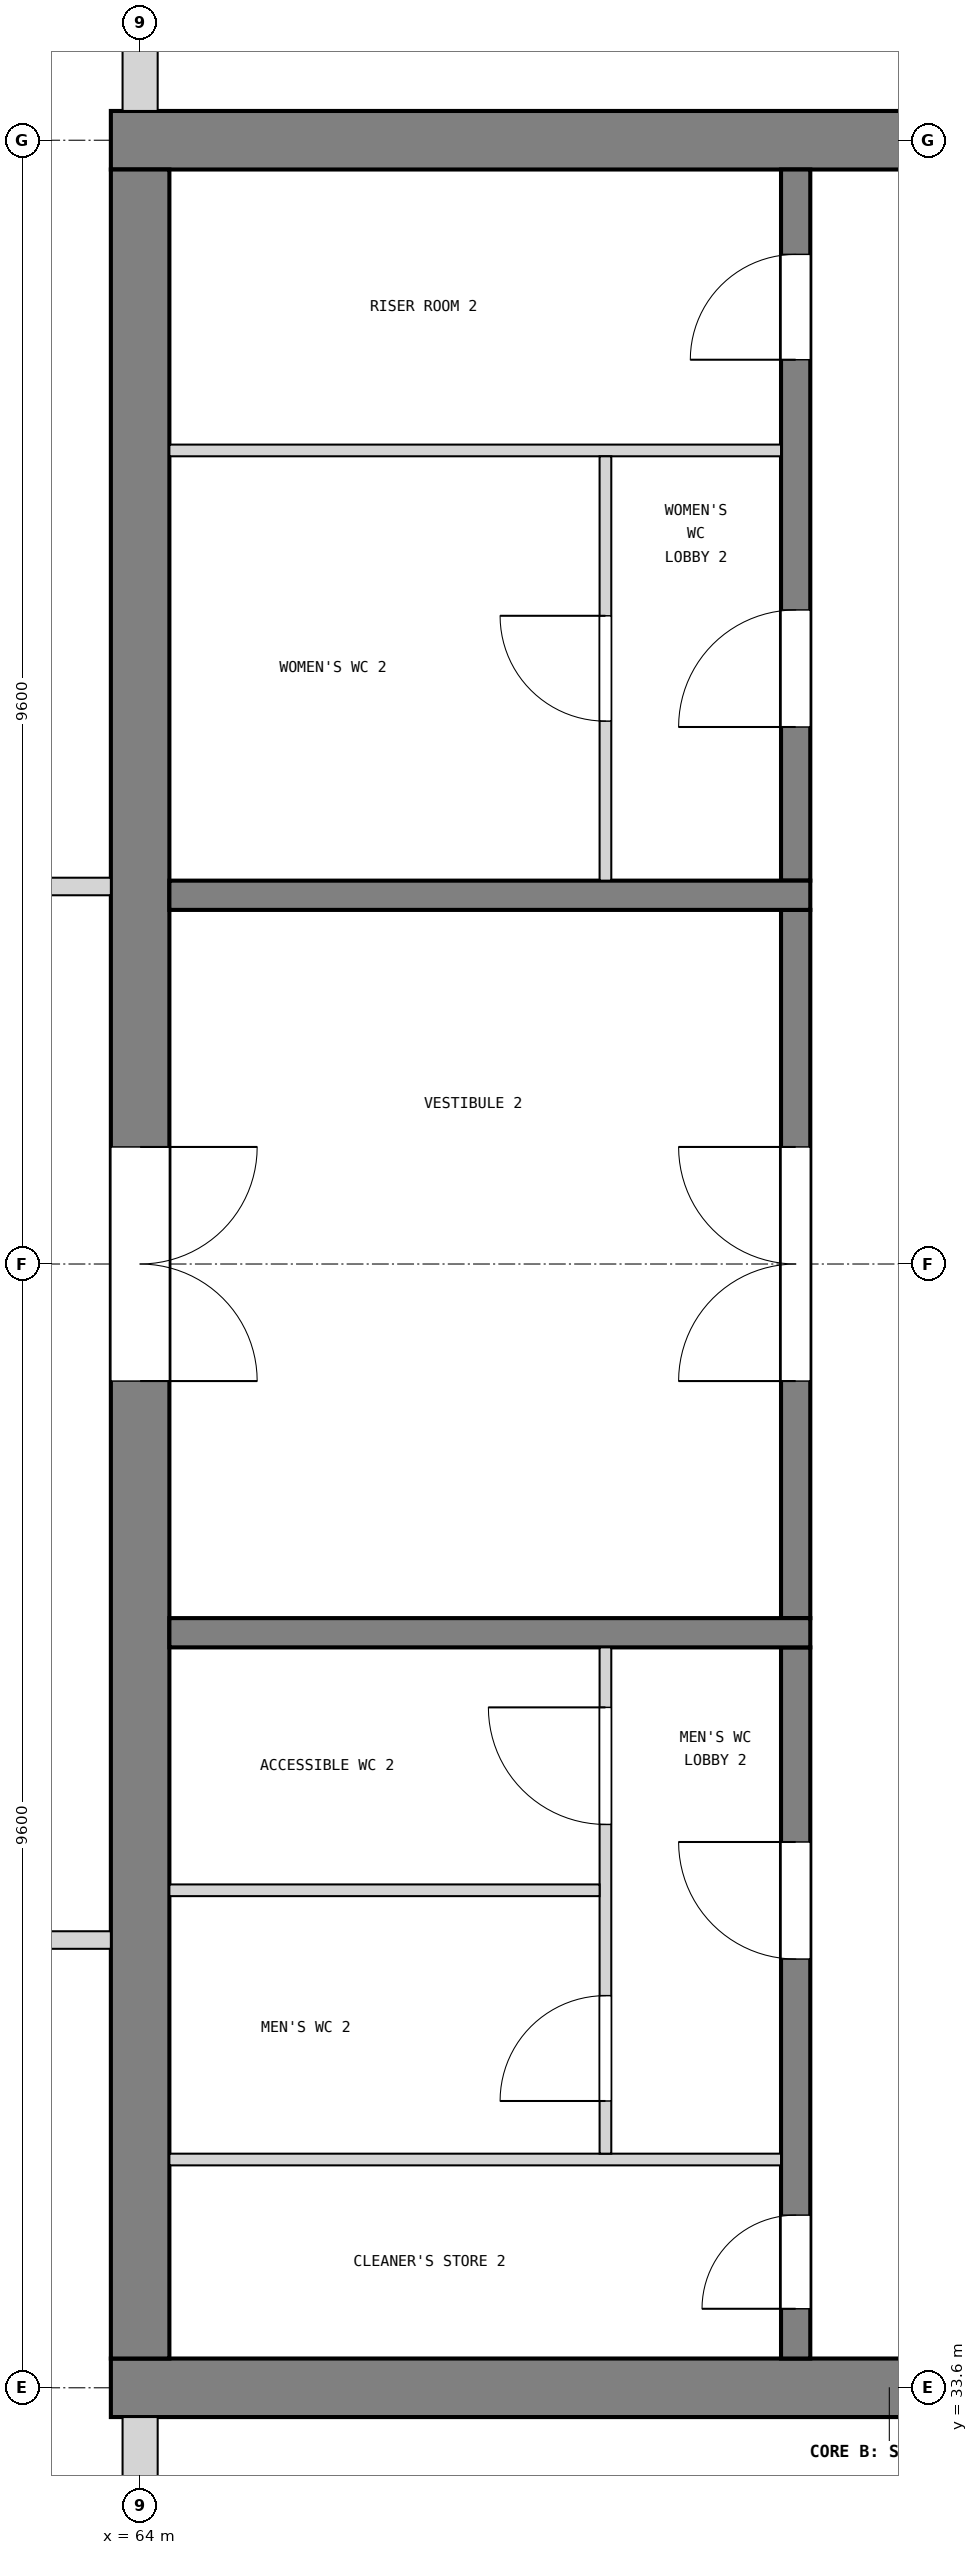
"""IFC4 building model, lengths in metres.
Left out: names, types, materials, properties, quantities, classifications, styles, units other than length and angle.
Written with IfcOpenShell. Run it as: python <this file> out.ifc"""

import sys

from ifc_helpers import new_model, si_unit, direction, frame, frame_2d, origin, place, context, subcontext, project, spatial, rectangle, extrude, element, fill, save


model = new_model("IFC4")
c1 = context("Model", 3, precision=1e-05, world=origin(), true_north=direction((0.0, 1.0)))
c2 = subcontext(c1, "Body", "Model", "MODEL_VIEW")
j1 = project(units=[si_unit("LENGTHUNIT", "METRE"), si_unit("PLANEANGLEUNIT", "RADIAN")], contexts=[c1])
p1 = place(None, origin())
s1 = spatial("IfcSite", under=j1, at=p1, CompositionType="ELEMENT")
p2 = place(p1, origin())
s2 = spatial("IfcBuilding", under=s1, at=p2, CompositionType="ELEMENT")
p3 = place(p2, frame((0.0, 0.0, 56.1)))
s3 = spatial("IfcBuildingStorey", under=s2, at=p3, CompositionType="ELEMENT", Elevation=56.1)
p4 = place(p3, frame((63.75, 52.8, 0.0), z_axis=(0.0, 0.0, 1.0), x_axis=(1.0, 0.0, 0.0)))
e1 = element("IfcWall", 1, at=p4, inside=s3, PredefinedType="SHEAR", context=c2, shape_type="SweptSolid", body=[
    extrude(rectangle(XDim=13.3, YDim=0.5, at=frame_2d((6.65, 0.0))), origin(), (0.0, 0.0, 1.0), 3.9),
])
p5 = place(p4, frame((11.05, 0.0, 1.0)))
e2 = element("IfcOpeningElement", 2, at=p5, cuts=e1, PredefinedType="OPENING", context=c2, shape_type="SweptSolid", body=[
    extrude(rectangle(XDim=0.4, YDim=2.0, at=frame_2d((0.2, 1.0))), frame((0.0, 0.26, 0.0), z_axis=(0.0, -1.0, 0.0), x_axis=(1.0, 0.0, 0.0)), (0.0, 0.0, 1.0), 0.52),
])
p6 = place(p3, frame((63.75, 33.6, 0.0), z_axis=(0.0, 0.0, 1.0), x_axis=(1.0, 0.0, 0.0)))
e3 = element("IfcWall", 3, at=p6, inside=s3, PredefinedType="SHEAR", context=c2, shape_type="SweptSolid", body=[
    extrude(rectangle(XDim=13.3, YDim=0.5, at=frame_2d((6.65, 0.0))), origin(), (0.0, 0.0, 1.0), 3.9),
])
p7 = place(p6, frame((11.05, 0.0, 1.0)))
e4 = element("IfcOpeningElement", 4, at=p7, cuts=e3, PredefinedType="OPENING", context=c2, shape_type="SweptSolid", body=[
    extrude(rectangle(XDim=0.4, YDim=2.0, at=frame_2d((0.2, 1.0))), frame((0.0, 0.26, 0.0), z_axis=(0.0, -1.0, 0.0), x_axis=(1.0, 0.0, 0.0)), (0.0, 0.0, 1.0), 0.52),
])
p8 = place(p3, frame((64.0, 33.85, 0.0), z_axis=(0.0, 0.0, 1.0), x_axis=(0.0, 1.0, 0.0)))
e5 = element("IfcWall", 5, at=p8, inside=s3, PredefinedType="SHEAR", context=c2, shape_type="SweptSolid", body=[
    extrude(rectangle(XDim=18.7, YDim=0.5, at=frame_2d((9.35, 0.0))), origin(), (0.0, 0.0, 1.0), 3.9),
])
p9 = place(p8, frame((8.35, 0.0, 0.0)))
e6 = element("IfcOpeningElement", 6, at=p9, cuts=e5, PredefinedType="OPENING", context=c2, shape_type="SweptSolid", body=[
    extrude(rectangle(XDim=2.0, YDim=2.1, at=frame_2d((1.0, 1.05))), frame((0.0, 0.26, 0.0), z_axis=(0.0, -1.0, 0.0), x_axis=(1.0, 0.0, 0.0)), (0.0, 0.0, 1.0), 0.52),
])
p10 = place(p3, frame((64.0, 31.0, 0.0), z_axis=(0.0, 0.0, 1.0), x_axis=(0.0, 1.0, 0.0)))
e7 = element("IfcWall", 7, at=p10, inside=s3, PredefinedType="SOLIDWALL", context=c2, shape_type="SweptSolid", body=[
    extrude(rectangle(XDim=2.35, YDim=0.3, at=frame_2d((1.175, 0.0))), origin(), (0.0, 0.0, 1.0), 2.88),
])
p11 = place(p3, frame((64.0, 53.05, 0.0), z_axis=(0.0, 0.0, 1.0), x_axis=(0.0, 1.0, 0.0)))
e8 = element("IfcWall", 8, at=p11, inside=s3, PredefinedType="SOLIDWALL", context=c2, shape_type="SweptSolid", body=[
    extrude(rectangle(XDim=2.35, YDim=0.3, at=frame_2d((1.175, 0.0))), origin(), (0.0, 0.0, 1.0), 2.88),
])
p12 = place(p3, frame((69.6, 33.85, 0.0), z_axis=(0.0, 0.0, 1.0), x_axis=(0.0, 1.0, 0.0)))
e9 = element("IfcWall", 9, at=p12, inside=s3, PredefinedType="SOLIDWALL", context=c2, shape_type="SweptSolid", body=[
    extrude(rectangle(XDim=6.075, YDim=0.25, at=frame_2d((3.038, 0.0))), origin(), (0.0, 0.0, 1.0), 3.6),
])
p13 = place(p12, frame((0.425, 0.0, 0.0)))
e10 = element("IfcOpeningElement", 10, at=p13, cuts=e9, PredefinedType="OPENING", context=c2, shape_type="SweptSolid", body=[
    extrude(rectangle(XDim=0.8, YDim=2.1, at=frame_2d((0.4, 1.05))), frame((0.0, 0.135, 0.0), z_axis=(0.0, -1.0, 0.0), x_axis=(1.0, 0.0, 0.0)), (0.0, 0.0, 1.0), 0.27),
])
p14 = place(p12, frame((3.413, 0.0, 0.0)))
e11 = element("IfcOpeningElement", 11, at=p14, cuts=e9, PredefinedType="OPENING", context=c2, shape_type="SweptSolid", body=[
    extrude(rectangle(XDim=1.0, YDim=2.1, at=frame_2d((0.5, 1.05))), frame((0.0, 0.135, 0.0), z_axis=(0.0, -1.0, 0.0), x_axis=(1.0, 0.0, 0.0)), (0.0, 0.0, 1.0), 0.27),
])
p15 = place(p3, frame((69.6, 40.175, 0.0), z_axis=(0.0, 0.0, 1.0), x_axis=(0.0, 1.0, 0.0)))
e12 = element("IfcWall", 12, at=p15, inside=s3, PredefinedType="SOLIDWALL", context=c2, shape_type="SweptSolid", body=[
    extrude(rectangle(XDim=6.05, YDim=0.25, at=frame_2d((3.025, 0.0))), origin(), (0.0, 0.0, 1.0), 3.6),
])
p16 = place(p15, frame((2.025, 0.0, 0.0)))
e13 = element("IfcOpeningElement", 13, at=p16, cuts=e12, PredefinedType="OPENING", context=c2, shape_type="SweptSolid", body=[
    extrude(rectangle(XDim=2.0, YDim=2.1, at=frame_2d((1.0, 1.05))), frame((0.0, 0.135, 0.0), z_axis=(0.0, -1.0, 0.0), x_axis=(1.0, 0.0, 0.0)), (0.0, 0.0, 1.0), 0.27),
])
p17 = place(p3, frame((69.6, 46.475, 0.0), z_axis=(0.0, 0.0, 1.0), x_axis=(0.0, 1.0, 0.0)))
e14 = element("IfcWall", 14, at=p17, inside=s3, PredefinedType="SOLIDWALL", context=c2, shape_type="SweptSolid", body=[
    extrude(rectangle(XDim=6.075, YDim=0.25, at=frame_2d((3.038, 0.0))), origin(), (0.0, 0.0, 1.0), 3.6),
])
p18 = place(p17, frame((1.312, 0.0, 0.0)))
e15 = element("IfcOpeningElement", 15, at=p18, cuts=e14, PredefinedType="OPENING", context=c2, shape_type="SweptSolid", body=[
    extrude(rectangle(XDim=1.0, YDim=2.1, at=frame_2d((0.5, 1.05))), frame((0.0, 0.135, 0.0), z_axis=(0.0, -1.0, 0.0), x_axis=(1.0, 0.0, 0.0)), (0.0, 0.0, 1.0), 0.27),
])
p19 = place(p17, frame((4.45, 0.0, 0.0)))
e16 = element("IfcOpeningElement", 16, at=p19, cuts=e14, PredefinedType="OPENING", context=c2, shape_type="SweptSolid", body=[
    extrude(rectangle(XDim=0.9, YDim=2.1, at=frame_2d((0.45, 1.05))), frame((0.0, 0.135, 0.0), z_axis=(0.0, -1.0, 0.0), x_axis=(1.0, 0.0, 0.0)), (0.0, 0.0, 1.0), 0.27),
])
for number, where, z_axis, x_axis in (
    (17, (69.725, 40.05, 0.0), (0.0, 0.0, 1.0), (-1.0, 0.0, 0.0)),
    (18, (69.725, 46.35, 0.0), (0.0, 0.0, 1.0), (-1.0, 0.0, 0.0)),
):
    element("IfcWall", number, at=place(p3, frame(where, z_axis=z_axis, x_axis=x_axis)), inside=s3, PredefinedType="SOLIDWALL", context=c2, shape_type="SweptSolid", body=[
        extrude(rectangle(XDim=5.475, YDim=0.25, at=frame_2d((2.738, 0.0))), origin(), (0.0, 0.0, 1.0), 3.6),
    ])
p20 = place(p3, frame((69.475, 35.55, 0.0), z_axis=(0.0, 0.0, 1.0), x_axis=(-1.0, 0.0, 0.0)))
e19 = element("IfcWall", 19, at=p20, inside=s3, PredefinedType="PARTITIONING", context=c2, shape_type="SweptSolid", body=[
    extrude(rectangle(XDim=5.225, YDim=0.1, at=frame_2d((2.613, 0.0))), origin(), (0.0, 0.0, 1.0), 3.6),
])
p21 = place(p3, frame((67.975, 35.6, 0.0), z_axis=(0.0, 0.0, 1.0), x_axis=(0.0, 1.0, 0.0)))
e20 = element("IfcWall", 20, at=p21, inside=s3, PredefinedType="PARTITIONING", context=c2, shape_type="SweptSolid", body=[
    extrude(rectangle(XDim=4.325, YDim=0.1, at=frame_2d((2.163, 0.0))), origin(), (0.0, 0.0, 1.0), 3.6),
])
p22 = place(p21, frame((0.45, 0.0, 0.0)))
e21 = element("IfcOpeningElement", 21, at=p22, cuts=e20, PredefinedType="OPENING", context=c2, shape_type="SweptSolid", body=[
    extrude(rectangle(XDim=0.9, YDim=2.1, at=frame_2d((0.45, 1.05))), frame((0.0, 0.06, 0.0), z_axis=(0.0, -1.0, 0.0), x_axis=(1.0, 0.0, 0.0)), (0.0, 0.0, 1.0), 0.12),
])
p23 = place(p21, frame((2.812, 0.0, 0.0)))
e22 = element("IfcOpeningElement", 22, at=p23, cuts=e20, PredefinedType="OPENING", context=c2, shape_type="SweptSolid", body=[
    extrude(rectangle(XDim=1.0, YDim=2.1, at=frame_2d((0.5, 1.05))), frame((0.0, 0.06, 0.0), z_axis=(0.0, -1.0, 0.0), x_axis=(1.0, 0.0, 0.0)), (0.0, 0.0, 1.0), 0.12),
])
p24 = place(p3, frame((67.925, 37.85, 0.0), z_axis=(0.0, 0.0, 1.0), x_axis=(-1.0, 0.0, 0.0)))
e23 = element("IfcWall", 23, at=p24, inside=s3, PredefinedType="PARTITIONING", context=c2, shape_type="SweptSolid", body=[
    extrude(rectangle(XDim=3.675, YDim=0.1, at=frame_2d((1.837, 0.0))), origin(), (0.0, 0.0, 1.0), 3.6),
])
p25 = place(p3, frame((69.475, 50.15, 0.0), z_axis=(0.0, 0.0, 1.0), x_axis=(-1.0, 0.0, 0.0)))
e24 = element("IfcWall", 24, at=p25, inside=s3, PredefinedType="PARTITIONING", context=c2, shape_type="SweptSolid", body=[
    extrude(rectangle(XDim=5.225, YDim=0.1, at=frame_2d((2.613, 0.0))), origin(), (0.0, 0.0, 1.0), 3.6),
])
p26 = place(p3, frame((67.975, 46.475, 0.0), z_axis=(0.0, 0.0, 1.0), x_axis=(0.0, 1.0, 0.0)))
e25 = element("IfcWall", 25, at=p26, inside=s3, PredefinedType="PARTITIONING", context=c2, shape_type="SweptSolid", body=[
    extrude(rectangle(XDim=3.625, YDim=0.1, at=frame_2d((1.812, 0.0))), origin(), (0.0, 0.0, 1.0), 3.6),
])
p27 = place(p26, frame((1.363, 0.0, 0.0)))
e26 = element("IfcOpeningElement", 26, at=p27, cuts=e25, PredefinedType="OPENING", context=c2, shape_type="SweptSolid", body=[
    extrude(rectangle(XDim=0.9, YDim=2.1, at=frame_2d((0.45, 1.05))), frame((0.0, 0.06, 0.0), z_axis=(0.0, -1.0, 0.0), x_axis=(1.0, 0.0, 0.0)), (0.0, 0.0, 1.0), 0.12),
])
p28 = place(p3, frame((57.78, 37.425, 0.0), z_axis=(0.0, 0.0, 1.0), x_axis=(1.0, 0.0, 0.0)))
e27 = element("IfcWall", 27, at=p28, inside=s3, PredefinedType="PARTITIONING", context=c2, shape_type="SweptSolid", body=[
    extrude(rectangle(XDim=5.97, YDim=0.15, at=frame_2d((2.985, 0.0))), origin(), (0.0, 0.0, 1.0), 3.68),
])
p29 = place(p28, frame((2.52, 0.0, 0.0)))
e28 = element("IfcOpeningElement", 28, at=p29, cuts=e27, PredefinedType="OPENING", context=c2, shape_type="SweptSolid", body=[
    extrude(rectangle(XDim=1.0, YDim=2.1, at=frame_2d((0.5, 1.05))), frame((0.0, 0.085, 0.0), z_axis=(0.0, -1.0, 0.0), x_axis=(1.0, 0.0, 0.0)), (0.0, 0.0, 1.0), 0.17),
])
p30 = place(p3, frame((57.78, 46.425, 0.0), z_axis=(0.0, 0.0, 1.0), x_axis=(1.0, 0.0, 0.0)))
e29 = element("IfcWall", 29, at=p30, inside=s3, PredefinedType="PARTITIONING", context=c2, shape_type="SweptSolid", body=[
    extrude(rectangle(XDim=5.97, YDim=0.15, at=frame_2d((2.985, 0.0))), origin(), (0.0, 0.0, 1.0), 3.68),
])
p31 = place(p30, frame((2.12, 0.0, 0.0)))
e30 = element("IfcOpeningElement", 30, at=p31, cuts=e29, PredefinedType="OPENING", context=c2, shape_type="SweptSolid", body=[
    extrude(rectangle(XDim=1.8, YDim=2.1, at=frame_2d((0.9, 1.05))), frame((0.0, 0.085, 0.0), z_axis=(0.0, -1.0, 0.0), x_axis=(1.0, 0.0, 0.0)), (0.0, 0.0, 1.0), 0.17),
])
p32 = place(p16, origin())
e31 = element("IfcDoor", 31, at=p32, inside=s3, OperationType="DOUBLE_DOOR_SINGLE_SWING", PredefinedType="DOOR", context=c2, shape_type="SweptSolid", body=[
    extrude(rectangle(XDim=2.0, YDim=2.1, at=frame_2d((1.0, 1.05))), frame((0.0, 0.025, 0.0), z_axis=(0.0, -1.0, 0.0), x_axis=(1.0, 0.0, 0.0)), (0.0, 0.0, 1.0), 0.05),
])
fill(e13, e31)
p33 = place(p9, frame((2.0, 0.0, 0.0), z_axis=(0.0, 0.0, 1.0), x_axis=(-1.0, 0.0, 0.0)))
e32 = element("IfcDoor", 32, at=p33, inside=s3, OperationType="DOUBLE_DOOR_SINGLE_SWING", PredefinedType="DOOR", context=c2, shape_type="SweptSolid", body=[
    extrude(rectangle(XDim=2.0, YDim=2.1, at=frame_2d((1.0, 1.05))), frame((0.0, 0.025, 0.0), z_axis=(0.0, -1.0, 0.0), x_axis=(1.0, 0.0, 0.0)), (0.0, 0.0, 1.0), 0.05),
])
fill(e6, e32)
p34 = place(p13, origin())
e33 = element("IfcDoor", 33, at=p34, inside=s3, OperationType="SINGLE_SWING_LEFT", PredefinedType="DOOR", context=c2, shape_type="SweptSolid", body=[
    extrude(rectangle(XDim=0.8, YDim=2.1, at=frame_2d((0.4, 1.05))), frame((0.0, 0.025, 0.0), z_axis=(0.0, -1.0, 0.0), x_axis=(1.0, 0.0, 0.0)), (0.0, 0.0, 1.0), 0.05),
])
fill(e10, e33)
p35 = place(p14, origin())
e34 = element("IfcDoor", 34, at=p35, inside=s3, OperationType="SINGLE_SWING_RIGHT", PredefinedType="DOOR", context=c2, shape_type="SweptSolid", body=[
    extrude(rectangle(XDim=1.0, YDim=2.1, at=frame_2d((0.5, 1.05))), frame((0.0, 0.025, 0.0), z_axis=(0.0, -1.0, 0.0), x_axis=(1.0, 0.0, 0.0)), (0.0, 0.0, 1.0), 0.05),
])
fill(e11, e34)
p36 = place(p22, origin())
e35 = element("IfcDoor", 35, at=p36, inside=s3, OperationType="SINGLE_SWING_LEFT", PredefinedType="DOOR", context=c2, shape_type="SweptSolid", body=[
    extrude(rectangle(XDim=0.9, YDim=2.1, at=frame_2d((0.45, 1.05))), frame((0.0, 0.025, 0.0), z_axis=(0.0, -1.0, 0.0), x_axis=(1.0, 0.0, 0.0)), (0.0, 0.0, 1.0), 0.05),
])
fill(e21, e35)
p37 = place(p23, origin())
e36 = element("IfcDoor", 36, at=p37, inside=s3, OperationType="SINGLE_SWING_RIGHT", PredefinedType="DOOR", context=c2, shape_type="SweptSolid", body=[
    extrude(rectangle(XDim=1.0, YDim=2.1, at=frame_2d((0.5, 1.05))), frame((0.0, 0.025, 0.0), z_axis=(0.0, -1.0, 0.0), x_axis=(1.0, 0.0, 0.0)), (0.0, 0.0, 1.0), 0.05),
])
fill(e22, e36)
p38 = place(p18, origin())
e37 = element("IfcDoor", 37, at=p38, inside=s3, OperationType="SINGLE_SWING_LEFT", PredefinedType="DOOR", context=c2, shape_type="SweptSolid", body=[
    extrude(rectangle(XDim=1.0, YDim=2.1, at=frame_2d((0.5, 1.05))), frame((0.0, 0.025, 0.0), z_axis=(0.0, -1.0, 0.0), x_axis=(1.0, 0.0, 0.0)), (0.0, 0.0, 1.0), 0.05),
])
fill(e15, e37)
p39 = place(p27, origin())
e38 = element("IfcDoor", 38, at=p39, inside=s3, OperationType="SINGLE_SWING_RIGHT", PredefinedType="DOOR", context=c2, shape_type="SweptSolid", body=[
    extrude(rectangle(XDim=0.9, YDim=2.1, at=frame_2d((0.45, 1.05))), frame((0.0, 0.025, 0.0), z_axis=(0.0, -1.0, 0.0), x_axis=(1.0, 0.0, 0.0)), (0.0, 0.0, 1.0), 0.05),
])
fill(e26, e38)
p40 = place(p19, origin())
e39 = element("IfcDoor", 39, at=p40, inside=s3, OperationType="SINGLE_SWING_LEFT", PredefinedType="DOOR", context=c2, shape_type="SweptSolid", body=[
    extrude(rectangle(XDim=0.9, YDim=2.1, at=frame_2d((0.45, 1.05))), frame((0.0, 0.025, 0.0), z_axis=(0.0, -1.0, 0.0), x_axis=(1.0, 0.0, 0.0)), (0.0, 0.0, 1.0), 0.05),
])
fill(e16, e39)
save(model, sys.argv[1])
